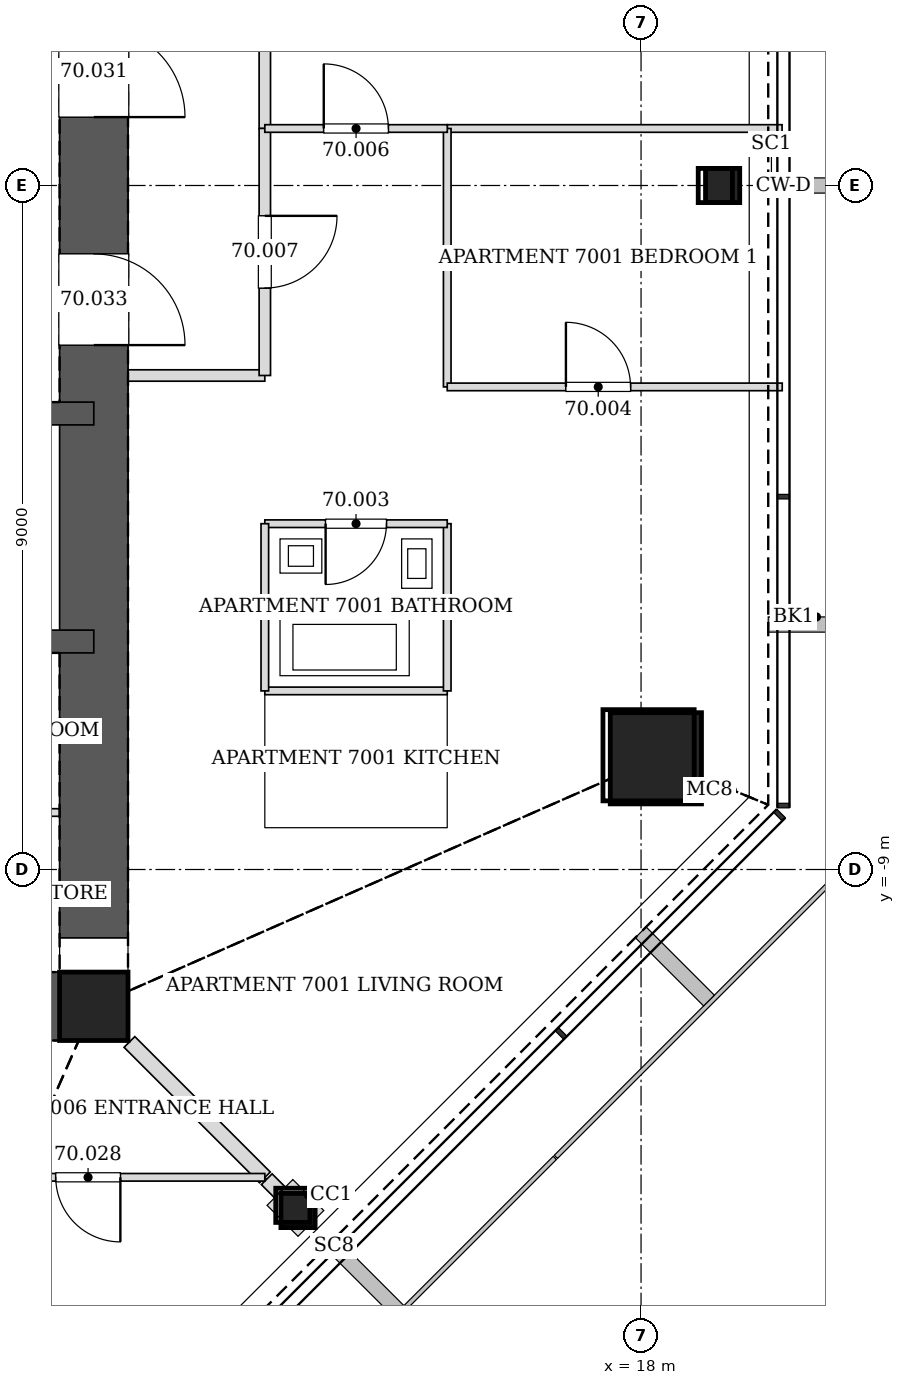
"""IFC4 building model, lengths in metres.
Left out: names, types, materials, properties, quantities, classifications, styles, units other than length and angle.
Written with IfcOpenShell. Run it as: python <this file> out.ifc"""

import sys

from ifc_helpers import new_model, si_unit, direction, frame, frame_2d, origin, origin_2d, place, context, subcontext, project, spatial, rectangle, hollow_rectangle, extrude, element, fill, save


model = new_model("IFC4")
c1 = context("Model", 3, precision=1e-05, world=origin(), true_north=direction((0.0, 1.0)))
c2 = subcontext(c1, "Body", "Model", "MODEL_VIEW")
j1 = project(units=[si_unit("LENGTHUNIT", "METRE"), si_unit("PLANEANGLEUNIT", "RADIAN")], contexts=[c1])
p1 = place(None, origin())
s1 = spatial("IfcSite", under=j1, at=p1, CompositionType="ELEMENT")
p2 = place(p1, origin())
s2 = spatial("IfcBuilding", under=s1, at=p2, CompositionType="ELEMENT")
p3 = place(p2, frame((0.0, 0.0, 287.8)))
s3 = spatial("IfcBuildingStorey", under=s2, at=p3, CompositionType="ELEMENT", Elevation=287.8)
p4 = place(p3, frame((18.195, -7.537, 0.0), z_axis=(-0.02827915051, 0.01169924247, 0.999531598986), x_axis=(-0.382282742426, -0.924045401938, 0.0)))
e1 = element("IfcColumn", 1, at=p4, inside=s3, PredefinedType="COLUMN", context=c2, shape_type="SweptSolid", body=[
    extrude(hollow_rectangle(XDim=1.2, YDim=1.2, WallThickness=0.055, at=origin_2d()), origin(), (0.0, 0.0, 1.0), 3.402),
])
for number, where, z_axis, x_axis in (
    (2, (19.073, 0.0, 0.0), (-0.028, 0.0, 1.0), (0.0, -1.0, 0.0)),
    (3, (13.487, -13.487, 0.0), (-0.02, 0.02, 1.0), (-0.707, -0.707, 0.0)),
):
    element("IfcColumn", number, at=place(p3, frame(where, z_axis=z_axis, x_axis=x_axis)), inside=s3, PredefinedType="COLUMN", context=c2, shape_type="SweptSolid", body=[
        extrude(hollow_rectangle(XDim=0.45, YDim=0.45, WallThickness=0.02, at=origin_2d()), origin(), (0.0, 0.0, 1.0), 3.401),
    ])
p5 = place(p3, frame((10.8, -10.8, 0.0), z_axis=(0.0, 0.0, 1.0), x_axis=(1.0, 0.0, 0.0)))
e4 = element("IfcColumn", 4, at=p5, inside=s3, PredefinedType="COLUMN", context=c2, shape_type="SweptSolid", body=[
    extrude(hollow_rectangle(XDim=0.9, YDim=0.9, WallThickness=0.04, at=origin_2d()), origin(), (0.0, 0.0, 1.0), 3.4),
])
p6 = place(p3, frame((-10.8, -10.8, 0.0), z_axis=(0.0, 0.0, 1.0), x_axis=(1.0, 0.0, 0.0)))
e5 = element("IfcWall", 5, at=p6, inside=s3, PredefinedType="SOLIDWALL", context=c2, shape_type="SweptSolid", body=[
    extrude(rectangle(XDim=21.6, YDim=0.9, at=frame_2d((10.8, 0.0))), origin(), (0.0, 0.0, 1.0), 3.4),
])
p7 = place(p6, frame((10.05, 0.0, 0.0)))
e6 = element("IfcOpeningElement", 6, at=p7, cuts=e5, PredefinedType="OPENING", context=c2, shape_type="SweptSolid", body=[
    extrude(rectangle(XDim=1.5, YDim=2.1, at=frame_2d((0.75, 1.05))), frame((0.0, 0.46, 0.0), z_axis=(0.0, -1.0, 0.0), x_axis=(1.0, 0.0, 0.0)), (0.0, 0.0, 1.0), 0.92),
])
p8 = place(p6, frame((17.1, 0.0, 0.0)))
e7 = element("IfcOpeningElement", 7, at=p8, cuts=e5, PredefinedType="OPENING", context=c2, shape_type="SweptSolid", body=[
    extrude(rectangle(XDim=0.9, YDim=2.1, at=frame_2d((0.45, 1.05))), frame((0.0, 0.46, 0.0), z_axis=(0.0, -1.0, 0.0), x_axis=(1.0, 0.0, 0.0)), (0.0, 0.0, 1.0), 0.92),
])
p9 = place(p3, frame((10.8, -10.8, 0.0), z_axis=(0.0, 0.0, 1.0), x_axis=(0.0, 1.0, 0.0)))
e8 = element("IfcWall", 8, at=p9, inside=s3, PredefinedType="SOLIDWALL", context=c2, shape_type="SweptSolid", body=[
    extrude(rectangle(XDim=21.6, YDim=0.9, at=frame_2d((10.8, 0.0))), origin(), (0.0, 0.0, 1.0), 3.4),
])
p10 = place(p9, frame((11.7, 0.0, 0.0)))
e9 = element("IfcOpeningElement", 9, at=p10, cuts=e8, PredefinedType="OPENING", context=c2, shape_type="SweptSolid", body=[
    extrude(rectangle(XDim=1.2, YDim=2.1, at=frame_2d((0.6, 1.05))), frame((0.0, 0.46, 0.0), z_axis=(0.0, -1.0, 0.0), x_axis=(1.0, 0.0, 0.0)), (0.0, 0.0, 1.0), 0.92),
])
p11 = place(p9, frame((8.7, 0.0, 0.0)))
e10 = element("IfcOpeningElement", 10, at=p11, cuts=e8, PredefinedType="OPENING", context=c2, shape_type="SweptSolid", body=[
    extrude(rectangle(XDim=1.2, YDim=2.1, at=frame_2d((0.6, 1.05))), frame((0.0, 0.46, 0.0), z_axis=(0.0, -1.0, 0.0), x_axis=(1.0, 0.0, 0.0)), (0.0, 0.0, 1.0), 0.92),
])
p12 = place(p3, frame((-10.8, -3.0, 0.0), z_axis=(0.0, 0.0, 1.0), x_axis=(1.0, 0.0, 0.0)))
e11 = element("IfcWall", 11, at=p12, inside=s3, PredefinedType="SOLIDWALL", context=c2, shape_type="SweptSolid", body=[
    extrude(rectangle(XDim=21.6, YDim=0.3, at=frame_2d((10.8, 0.0))), origin(), (0.0, 0.0, 1.0), 3.4),
])
p13 = place(p12, frame((4.55, 0.0, 0.0)))
e12 = element("IfcOpeningElement", 12, at=p13, cuts=e11, PredefinedType="OPENING", context=c2, shape_type="SweptSolid", body=[
    extrude(rectangle(XDim=0.9, YDim=2.1, at=frame_2d((0.45, 1.05))), frame((0.0, 0.16, 0.0), z_axis=(0.0, -1.0, 0.0), x_axis=(1.0, 0.0, 0.0)), (0.0, 0.0, 1.0), 0.32),
])
p14 = place(p12, frame((7.45, 0.0, 0.0)))
e13 = element("IfcOpeningElement", 13, at=p14, cuts=e11, PredefinedType="OPENING", context=c2, shape_type="SweptSolid", body=[
    extrude(rectangle(XDim=0.9, YDim=2.1, at=frame_2d((0.45, 1.05))), frame((0.0, 0.16, 0.0), z_axis=(0.0, -1.0, 0.0), x_axis=(1.0, 0.0, 0.0)), (0.0, 0.0, 1.0), 0.32),
])
p15 = place(p12, frame((1.65, 0.0, 0.0)))
e14 = element("IfcOpeningElement", 14, at=p15, cuts=e11, PredefinedType="OPENING", context=c2, shape_type="SweptSolid", body=[
    extrude(rectangle(XDim=0.9, YDim=2.1, at=frame_2d((0.45, 1.05))), frame((0.0, 0.16, 0.0), z_axis=(0.0, -1.0, 0.0), x_axis=(1.0, 0.0, 0.0)), (0.0, 0.0, 1.0), 0.32),
])
p16 = place(p12, frame((13.25, 0.0, 0.0)))
e15 = element("IfcOpeningElement", 15, at=p16, cuts=e11, PredefinedType="OPENING", context=c2, shape_type="SweptSolid", body=[
    extrude(rectangle(XDim=0.9, YDim=2.1, at=frame_2d((0.45, 1.05))), frame((0.0, 0.16, 0.0), z_axis=(0.0, -1.0, 0.0), x_axis=(1.0, 0.0, 0.0)), (0.0, 0.0, 1.0), 0.32),
])
p17 = place(p12, frame((16.05, 0.0, 0.0)))
e16 = element("IfcOpeningElement", 16, at=p17, cuts=e11, PredefinedType="OPENING", context=c2, shape_type="SweptSolid", body=[
    extrude(rectangle(XDim=1.1, YDim=2.1, at=frame_2d((0.55, 1.05))), frame((0.0, 0.16, 0.0), z_axis=(0.0, -1.0, 0.0), x_axis=(1.0, 0.0, 0.0)), (0.0, 0.0, 1.0), 0.32),
])
p18 = place(p12, frame((18.95, 0.0, 0.0)))
e17 = element("IfcOpeningElement", 17, at=p18, cuts=e11, PredefinedType="OPENING", context=c2, shape_type="SweptSolid", body=[
    extrude(rectangle(XDim=1.1, YDim=2.1, at=frame_2d((0.55, 1.05))), frame((0.0, 0.16, 0.0), z_axis=(0.0, -1.0, 0.0), x_axis=(1.0, 0.0, 0.0)), (0.0, 0.0, 1.0), 0.32),
])
p19 = place(p3, frame((-10.8, -6.0, 0.0), z_axis=(0.0, 0.0, 1.0), x_axis=(1.0, 0.0, 0.0)))
e18 = element("IfcWall", 18, at=p19, inside=s3, PredefinedType="SOLIDWALL", context=c2, shape_type="SweptSolid", body=[
    extrude(rectangle(XDim=21.6, YDim=0.3, at=frame_2d((10.8, 0.0))), origin(), (0.0, 0.0, 1.0), 3.4),
])
p20 = place(p19, frame((10.25, 0.0, 0.0)))
e19 = element("IfcOpeningElement", 19, at=p20, cuts=e18, PredefinedType="OPENING", context=c2, shape_type="SweptSolid", body=[
    extrude(rectangle(XDim=1.1, YDim=2.1, at=frame_2d((0.55, 1.05))), frame((0.0, 0.16, 0.0), z_axis=(0.0, -1.0, 0.0), x_axis=(1.0, 0.0, 0.0)), (0.0, 0.0, 1.0), 0.32),
])
p21 = place(p3, frame((13.05, 0.749, 0.0), z_axis=(0.0, 0.0, 1.0), x_axis=(0.0, 1.0, 0.0)))
e20 = element("IfcWall", 20, at=p21, inside=s3, PredefinedType="PARTITIONING", context=c2, shape_type="SweptSolid", body=[
    extrude(rectangle(XDim=1.502, YDim=0.15, at=frame_2d((0.751, 0.0))), origin(), (0.0, 0.0, 1.0), 3.2),
])
p22 = place(p3, frame((11.25, -2.5, 0.0), z_axis=(0.0, 0.0, 1.0), x_axis=(1.0, 0.0, 0.0)))
e21 = element("IfcWall", 21, at=p22, inside=s3, PredefinedType="PARTITIONING", context=c2, shape_type="SweptSolid", body=[
    extrude(rectangle(XDim=1.8, YDim=0.15, at=frame_2d((0.9, 0.0))), origin(), (0.0, 0.0, 1.0), 3.2),
])
p23 = place(p3, frame((13.05, -2.5, 0.0), z_axis=(0.0, 0.0, 1.0), x_axis=(0.0, 1.0, 0.0)))
e22 = element("IfcWall", 22, at=p23, inside=s3, PredefinedType="PARTITIONING", context=c2, shape_type="SweptSolid", body=[
    extrude(rectangle(XDim=3.251, YDim=0.15, at=frame_2d((1.625, 0.0))), origin(), (0.0, 0.0, 1.0), 2.349),
])
p24 = place(p23, frame((1.15, 0.0, 0.0)))
e23 = element("IfcOpeningElement", 23, at=p24, cuts=e22, PredefinedType="OPENING", context=c2, shape_type="SweptSolid", body=[
    extrude(rectangle(XDim=0.95, YDim=2.1, at=frame_2d((0.475, 1.05))), frame((0.0, 0.085, 0.0), z_axis=(0.0, -1.0, 0.0), x_axis=(1.0, 0.0, 0.0)), (0.0, 0.0, 1.0), 0.17),
])
p25 = place(p3, frame((15.45, -6.65, 0.0), z_axis=(0.0, 0.0, 1.0), x_axis=(-1.0, 0.0, 0.0)))
e24 = element("IfcWall", 24, at=p25, inside=s3, PredefinedType="PARTITIONING", context=c2, shape_type="SweptSolid", body=[
    extrude(rectangle(XDim=2.4, YDim=0.1, at=frame_2d((1.2, 0.0))), origin(), (0.0, 0.0, 1.0), 2.591),
])
p26 = place(p3, frame((15.45, -6.65, 0.0), z_axis=(0.0, 0.0, 1.0), x_axis=(0.0, 1.0, 0.0)))
e25 = element("IfcWall", 25, at=p26, inside=s3, PredefinedType="PARTITIONING", context=c2, shape_type="SweptSolid", body=[
    extrude(rectangle(XDim=2.2, YDim=0.1, at=frame_2d((1.1, 0.0))), origin(), (0.0, 0.0, 1.0), 3.2),
])
p27 = place(p3, frame((15.45, -4.45, 0.0), z_axis=(0.0, 0.0, 1.0), x_axis=(-1.0, 0.0, 0.0)))
e26 = element("IfcWall", 26, at=p27, inside=s3, PredefinedType="PARTITIONING", context=c2, shape_type="SweptSolid", body=[
    extrude(rectangle(XDim=2.4, YDim=0.1, at=frame_2d((1.2, 0.0))), origin(), (0.0, 0.0, 1.0), 2.591),
])
p28 = place(p27, frame((0.8, 0.0, 0.0)))
e27 = element("IfcOpeningElement", 27, at=p28, cuts=e26, PredefinedType="OPENING", context=c2, shape_type="SweptSolid", body=[
    extrude(rectangle(XDim=0.8, YDim=2.1, at=frame_2d((0.4, 1.05))), frame((0.0, 0.06, 0.0), z_axis=(0.0, -1.0, 0.0), x_axis=(1.0, 0.0, 0.0)), (0.0, 0.0, 1.0), 0.12),
])
p29 = place(p3, frame((13.05, -4.45, 0.0), z_axis=(0.0, 0.0, 1.0), x_axis=(0.0, -1.0, 0.0)))
e28 = element("IfcWall", 28, at=p29, inside=s3, PredefinedType="PARTITIONING", context=c2, shape_type="SweptSolid", body=[
    extrude(rectangle(XDim=2.2, YDim=0.1, at=frame_2d((1.1, 0.0))), origin(), (0.0, 0.0, 1.0), 3.2),
])
p30 = place(p3, frame((19.855, 0.75, 0.0), z_axis=(0.0, 0.0, 1.0), x_axis=(-1.0, 0.0, 0.0)))
e29 = element("IfcWall", 29, at=p30, inside=s3, PredefinedType="PARTITIONING", context=c2, shape_type="SweptSolid", body=[
    extrude(rectangle(XDim=4.405, YDim=0.1, at=frame_2d((2.203, 0.0))), origin(), (0.0, 0.0, 1.0), 2.73),
])
p31 = place(p3, frame((15.45, 0.75, 0.0), z_axis=(0.0, 0.0, 1.0), x_axis=(0.0, -1.0, 0.0)))
e30 = element("IfcWall", 30, at=p31, inside=s3, PredefinedType="PARTITIONING", context=c2, shape_type="SweptSolid", body=[
    extrude(rectangle(XDim=3.4, YDim=0.1, at=frame_2d((1.7, 0.0))), origin(), (0.0, 0.0, 1.0), 2.349),
])
p32 = place(p3, frame((15.45, -2.65, 0.0), z_axis=(0.0, 0.0, 1.0), x_axis=(1.0, 0.0, 0.0)))
e31 = element("IfcWall", 31, at=p32, inside=s3, PredefinedType="PARTITIONING", context=c2, shape_type="SweptSolid", body=[
    extrude(rectangle(XDim=4.407, YDim=0.1, at=frame_2d((2.204, 0.0))), origin(), (0.0, 0.0, 1.0), 2.73),
])
p33 = place(p32, frame((1.562, 0.0, 0.0)))
e32 = element("IfcOpeningElement", 32, at=p33, cuts=e31, PredefinedType="OPENING", context=c2, shape_type="SweptSolid", body=[
    extrude(rectangle(XDim=0.85, YDim=2.1, at=frame_2d((0.425, 1.05))), frame((0.0, 0.06, 0.0), z_axis=(0.0, -1.0, 0.0), x_axis=(1.0, 0.0, 0.0)), (0.0, 0.0, 1.0), 0.12),
])
p34 = place(p3, frame((13.05, 0.75, 0.0), z_axis=(0.0, 0.0, 1.0), x_axis=(1.0, 0.0, 0.0)))
e33 = element("IfcWall", 33, at=p34, inside=s3, PredefinedType="PARTITIONING", context=c2, shape_type="SweptSolid", body=[
    extrude(rectangle(XDim=2.401, YDim=0.1, at=frame_2d((1.2, 0.0))), origin(), (0.0, 0.0, 1.0), 2.591),
])
p35 = place(p34, frame((0.775, 0.0, 0.0)))
e34 = element("IfcOpeningElement", 34, at=p35, cuts=e33, PredefinedType="OPENING", context=c2, shape_type="SweptSolid", body=[
    extrude(rectangle(XDim=0.85, YDim=2.1, at=frame_2d((0.425, 1.05))), frame((0.0, 0.06, 0.0), z_axis=(0.0, -1.0, 0.0), x_axis=(1.0, 0.0, 0.0)), (0.0, 0.0, 1.0), 0.12),
])
p36 = place(p3, frame((13.075, -13.075, 0.0), z_axis=(0.0, 0.0, 1.0), x_axis=(0.707106781187, -0.707106781187, 0.0)))
e35 = element("IfcWall", 35, at=p36, inside=s3, PredefinedType="PARTITIONING", context=c2, shape_type="SweptSolid", body=[
    extrude(rectangle(XDim=0.242, YDim=0.2, at=frame_2d((0.121, 0.0))), origin(), (0.0, 0.0, 1.0), 2.591),
])
p37 = place(p3, frame((11.269, -11.269, 0.0), z_axis=(0.0, 0.0, 1.0), x_axis=(0.707106781187, -0.707106781187, 0.0)))
e36 = element("IfcWall", 36, at=p37, inside=s3, PredefinedType="PARTITIONING", context=c2, shape_type="SweptSolid", body=[
    extrude(rectangle(XDim=2.52, YDim=0.2, at=frame_2d((1.26, 0.0))), origin(), (0.0, 0.0, 1.0), 2.591),
])
p38 = place(p3, frame((13.05, -13.05, 0.0), z_axis=(0.0, 0.0, 1.0), x_axis=(-1.0, 0.0, 0.0)))
e37 = element("IfcWall", 37, at=p38, inside=s3, PredefinedType="PARTITIONING", context=c2, shape_type="SweptSolid", body=[
    extrude(rectangle(XDim=4.651, YDim=0.1, at=frame_2d((2.326, 0.0))), origin(), (0.0, 0.0, 1.0), 2.497),
])
p39 = place(p38, frame((1.9, 0.0, 0.0)))
e38 = element("IfcOpeningElement", 38, at=p39, cuts=e37, PredefinedType="OPENING", context=c2, shape_type="SweptSolid", body=[
    extrude(rectangle(XDim=0.85, YDim=2.1, at=frame_2d((0.425, 1.05))), frame((0.0, 0.06, 0.0), z_axis=(0.0, -1.0, 0.0), x_axis=(1.0, 0.0, 0.0)), (0.0, 0.0, 1.0), 0.12),
])
p40 = place(p3, frame((7.7, -8.25, 0.0), z_axis=(0.0, 0.0, 1.0), x_axis=(1.0, 0.0, 0.0)))
e39 = element("IfcWall", 39, at=p40, inside=s3, PredefinedType="PARTITIONING", context=c2, shape_type="SweptSolid", body=[
    extrude(rectangle(XDim=2.65, YDim=0.1, at=frame_2d((1.325, 0.0))), origin(), (0.0, 0.0, 1.0), 3.2),
])
p41 = place(p28, origin())
e40 = element("IfcDoor", 40, at=p41, inside=s3, OperationType="SINGLE_SWING_RIGHT", PredefinedType="DOOR", context=c2, shape_type="SweptSolid", body=[
    extrude(rectangle(XDim=0.8, YDim=2.1, at=frame_2d((0.4, 1.05))), frame((0.0, 0.025, 0.0), z_axis=(0.0, -1.0, 0.0), x_axis=(1.0, 0.0, 0.0)), (0.0, 0.0, 1.0), 0.05),
])
fill(e27, e40)
p42 = place(p33, origin())
e41 = element("IfcDoor", 41, at=p42, inside=s3, OperationType="SINGLE_SWING_LEFT", PredefinedType="DOOR", context=c2, shape_type="SweptSolid", body=[
    extrude(rectangle(XDim=0.85, YDim=2.1, at=frame_2d((0.425, 1.05))), frame((0.0, 0.025, 0.0), z_axis=(0.0, -1.0, 0.0), x_axis=(1.0, 0.0, 0.0)), (0.0, 0.0, 1.0), 0.05),
])
fill(e32, e41)
p43 = place(p35, origin())
e42 = element("IfcDoor", 42, at=p43, inside=s3, OperationType="SINGLE_SWING_LEFT", PredefinedType="DOOR", context=c2, shape_type="SweptSolid", body=[
    extrude(rectangle(XDim=0.85, YDim=2.1, at=frame_2d((0.425, 1.05))), frame((0.0, 0.025, 0.0), z_axis=(0.0, -1.0, 0.0), x_axis=(1.0, 0.0, 0.0)), (0.0, 0.0, 1.0), 0.05),
])
fill(e34, e42)
p44 = place(p24, frame((0.95, 0.0, 0.0), z_axis=(0.0, 0.0, 1.0), x_axis=(-1.0, 0.0, 0.0)))
e43 = element("IfcDoor", 43, at=p44, inside=s3, OperationType="SINGLE_SWING_LEFT", PredefinedType="DOOR", context=c2, shape_type="SweptSolid", body=[
    extrude(rectangle(XDim=0.95, YDim=2.1, at=frame_2d((0.475, 1.05))), frame((0.0, 0.025, 0.0), z_axis=(0.0, -1.0, 0.0), x_axis=(1.0, 0.0, 0.0)), (0.0, 0.0, 1.0), 0.05),
])
fill(e23, e43)
p45 = place(p39, origin())
e44 = element("IfcDoor", 44, at=p45, inside=s3, OperationType="SINGLE_SWING_LEFT", PredefinedType="DOOR", context=c2, shape_type="SweptSolid", body=[
    extrude(rectangle(XDim=0.85, YDim=2.1, at=frame_2d((0.425, 1.05))), frame((0.0, 0.025, 0.0), z_axis=(0.0, -1.0, 0.0), x_axis=(1.0, 0.0, 0.0)), (0.0, 0.0, 1.0), 0.05),
])
fill(e38, e44)
p46 = place(p10, frame((1.2, 0.0, 0.0), z_axis=(0.0, 0.0, 1.0), x_axis=(-1.0, 0.0, 0.0)))
e45 = element("IfcDoor", 45, at=p46, inside=s3, OperationType="SINGLE_SWING_RIGHT", PredefinedType="DOOR", context=c2, shape_type="SweptSolid", body=[
    extrude(rectangle(XDim=1.2, YDim=2.1, at=frame_2d((0.6, 1.05))), frame((0.0, 0.025, 0.0), z_axis=(0.0, -1.0, 0.0), x_axis=(1.0, 0.0, 0.0)), (0.0, 0.0, 1.0), 0.05),
])
fill(e9, e45)
p47 = place(p11, frame((1.2, 0.0, 0.0), z_axis=(0.0, 0.0, 1.0), x_axis=(-1.0, 0.0, 0.0)))
e46 = element("IfcDoor", 46, at=p47, inside=s3, OperationType="SINGLE_SWING_RIGHT", PredefinedType="DOOR", context=c2, shape_type="SweptSolid", body=[
    extrude(rectangle(XDim=1.2, YDim=2.1, at=frame_2d((0.6, 1.05))), frame((0.0, 0.025, 0.0), z_axis=(0.0, -1.0, 0.0), x_axis=(1.0, 0.0, 0.0)), (0.0, 0.0, 1.0), 0.05),
])
fill(e10, e46)
save(model, sys.argv[1])
